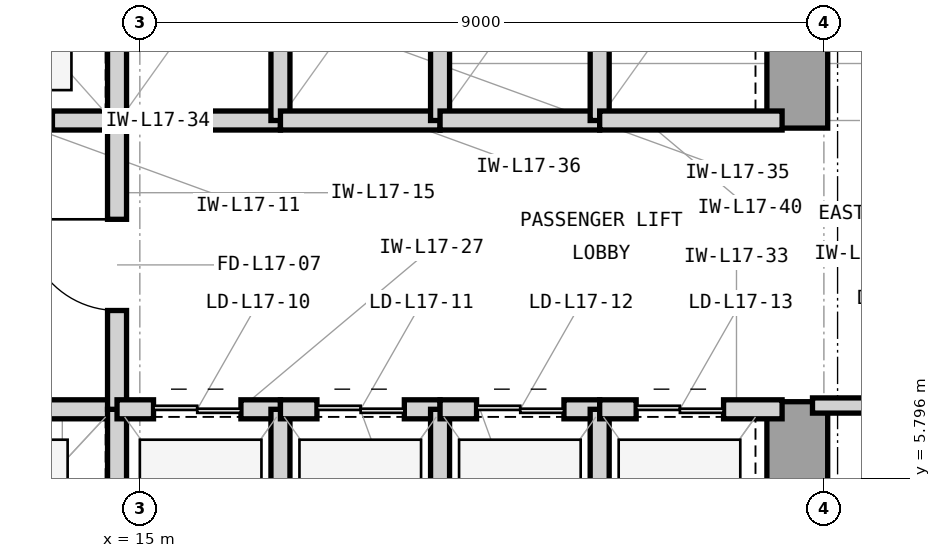
"""IFC4 building model, lengths in metres.
Left out: names, types, materials, properties, quantities, classifications, styles, units other than length and angle.
Written with IfcOpenShell. Run it as: python <this file> out.ifc"""

import sys

from ifc_helpers import new_model, si_unit, direction, frame, frame_2d, origin, place, context, subcontext, project, spatial, rectangle, extrude, element, fill, save


model = new_model("IFC4")
c1 = context("Model", 3, precision=1e-05, world=origin(), true_north=direction((0.0, 1.0)))
c2 = subcontext(c1, "Body", "Model", "MODEL_VIEW")
j1 = project(units=[si_unit("LENGTHUNIT", "METRE"), si_unit("PLANEANGLEUNIT", "RADIAN")], contexts=[c1])
p1 = place(None, origin())
s1 = spatial("IfcSite", under=j1, at=p1, CompositionType="ELEMENT")
p2 = place(p1, origin())
s2 = spatial("IfcBuilding", under=s1, at=p2, CompositionType="ELEMENT")
p3 = place(p2, frame((0.0, 0.0, 76.2)))
s3 = spatial("IfcBuildingStorey", under=s2, at=p3, CompositionType="ELEMENT", Elevation=76.2)
p4 = place(p3, frame((23.65, 3.75, 0.0), z_axis=(0.0, 0.0, 1.0), x_axis=(0.0, 1.0, 0.0)))
e1 = element("IfcWall", 1, at=p4, inside=s3, PredefinedType="SHEAR", context=c2, shape_type="SweptSolid", body=[
    extrude(rectangle(XDim=3.05, YDim=0.8, at=frame_2d((1.525, 0.0))), origin(), (0.0, 0.0, 1.0), 4.2),
])
p5 = place(p3, frame((23.65, 10.4, 0.0), z_axis=(0.0, 0.0, 1.0), x_axis=(0.0, 1.0, 0.0)))
e2 = element("IfcWall", 2, at=p5, inside=s3, PredefinedType="SHEAR", context=c2, shape_type="SweptSolid", body=[
    extrude(rectangle(XDim=3.2, YDim=0.8, at=frame_2d((1.6, 0.0))), origin(), (0.0, 0.0, 1.0), 4.2),
])
p6 = place(p3, frame((11.82, 6.7, 0.0), z_axis=(0.0, 0.0, 1.0), x_axis=(1.0, 0.0, 0.0)))
e3 = element("IfcWall", 3, at=p6, inside=s3, PredefinedType="PARTITIONING", context=c2, shape_type="SweptSolid", body=[
    extrude(rectangle(XDim=2.88, YDim=0.25, at=frame_2d((1.44, 0.0))), origin(), (0.0, 0.0, 1.0), 3.426),
])
p7 = place(p6, frame((0.85, 0.0, 0.0)))
e4 = element("IfcOpeningElement", 4, at=p7, cuts=e3, PredefinedType="OPENING", context=c2, shape_type="SweptSolid", body=[
    extrude(rectangle(XDim=1.1, YDim=2.25, at=frame_2d((0.55, 1.125))), frame((0.0, 0.135, 0.0), z_axis=(0.0, -1.0, 0.0), x_axis=(1.0, 0.0, 0.0)), (0.0, 0.0, 1.0), 0.27),
])
p8 = place(p3, frame((14.7, 3.35, 0.0), z_axis=(0.0, 0.0, 1.0), x_axis=(0.0, 1.0, 0.0)))
e5 = element("IfcWall", 5, at=p8, inside=s3, PredefinedType="PARTITIONING", context=c2, shape_type="SweptSolid", body=[
    extrude(rectangle(XDim=3.35, YDim=0.25, at=frame_2d((1.675, 0.0))), origin(), (0.0, 0.0, 1.0), 3.97),
])
p9 = place(p3, frame((11.95, 10.5, 0.0), z_axis=(0.0, 0.0, 1.0), x_axis=(1.0, 0.0, 0.0)))
e6 = element("IfcWall", 6, at=p9, inside=s3, PredefinedType="PARTITIONING", context=c2, shape_type="SweptSolid", body=[
    extrude(rectangle(XDim=2.75, YDim=0.25, at=frame_2d((1.375, 0.0))), origin(), (0.0, 0.0, 1.0), 3.426),
])
p10 = place(p9, frame((0.8, 0.0, 0.0)))
e7 = element("IfcOpeningElement", 7, at=p10, cuts=e6, PredefinedType="OPENING", context=c2, shape_type="SweptSolid", body=[
    extrude(rectangle(XDim=1.1, YDim=2.25, at=frame_2d((0.55, 1.125))), frame((0.0, 0.135, 0.0), z_axis=(0.0, -1.0, 0.0), x_axis=(1.0, 0.0, 0.0)), (0.0, 0.0, 1.0), 0.27),
])
p11 = place(p3, frame((14.7, 10.5, 0.0), z_axis=(0.0, 0.0, 1.0), x_axis=(0.0, 1.0, 0.0)))
e8 = element("IfcWall", 8, at=p11, inside=s3, PredefinedType="PARTITIONING", context=c2, shape_type="SweptSolid", body=[
    extrude(rectangle(XDim=3.0, YDim=0.25, at=frame_2d((1.5, 0.0))), origin(), (0.0, 0.0, 1.0), 3.97),
])
p12 = place(p3, frame((14.7, 6.7, 0.0), z_axis=(0.0, 0.0, 1.0), x_axis=(0.0, 1.0, 0.0)))
e9 = element("IfcWall", 9, at=p12, inside=s3, PredefinedType="PARTITIONING", context=c2, shape_type="SweptSolid", body=[
    extrude(rectangle(XDim=3.8, YDim=0.25, at=frame_2d((1.9, 0.0))), origin(), (0.0, 0.0, 1.0), 3.97),
])
p13 = place(p12, frame((1.3, 0.0, 0.0)))
e10 = element("IfcOpeningElement", 10, at=p13, cuts=e9, PredefinedType="OPENING", context=c2, shape_type="SweptSolid", body=[
    extrude(rectangle(XDim=1.2, YDim=2.2, at=frame_2d((0.6, 1.1))), frame((0.0, 0.135, 0.0), z_axis=(0.0, -1.0, 0.0), x_axis=(1.0, 0.0, 0.0)), (0.0, 0.0, 1.0), 0.27),
])
p14 = place(p3, frame((14.7, 6.7, 0.0), z_axis=(0.0, 0.0, 1.0), x_axis=(1.0, 0.0, 0.0)))
e11 = element("IfcWall", 11, at=p14, inside=s3, PredefinedType="PARTITIONING", context=c2, shape_type="SweptSolid", body=[
    extrude(rectangle(XDim=2.15, YDim=0.25, at=frame_2d((1.075, 0.0))), origin(), (0.0, 0.0, 1.0), 3.426),
])
p15 = place(p14, frame((0.48, 0.0, 0.0)))
e12 = element("IfcOpeningElement", 12, at=p15, cuts=e11, PredefinedType="OPENING", context=c2, shape_type="SweptSolid", body=[
    extrude(rectangle(XDim=1.15, YDim=2.25, at=frame_2d((0.575, 1.125))), frame((0.0, 0.135, 0.0), z_axis=(0.0, -1.0, 0.0), x_axis=(1.0, 0.0, 0.0)), (0.0, 0.0, 1.0), 0.27),
])
p16 = place(p3, frame((16.85, 3.35, 0.0), z_axis=(0.0, 0.0, 1.0), x_axis=(0.0, 1.0, 0.0)))
e13 = element("IfcWall", 13, at=p16, inside=s3, PredefinedType="PARTITIONING", context=c2, shape_type="SweptSolid", body=[
    extrude(rectangle(XDim=3.35, YDim=0.25, at=frame_2d((1.675, 0.0))), origin(), (0.0, 0.0, 1.0), 3.97),
])
p17 = place(p3, frame((16.85, 6.7, 0.0), z_axis=(0.0, 0.0, 1.0), x_axis=(1.0, 0.0, 0.0)))
e14 = element("IfcWall", 14, at=p17, inside=s3, PredefinedType="PARTITIONING", context=c2, shape_type="SweptSolid", body=[
    extrude(rectangle(XDim=2.1, YDim=0.25, at=frame_2d((1.05, 0.0))), origin(), (0.0, 0.0, 1.0), 3.426),
])
p18 = place(p17, frame((0.48, 0.0, 0.0)))
e15 = element("IfcOpeningElement", 15, at=p18, cuts=e14, PredefinedType="OPENING", context=c2, shape_type="SweptSolid", body=[
    extrude(rectangle(XDim=1.15, YDim=2.25, at=frame_2d((0.575, 1.125))), frame((0.0, 0.135, 0.0), z_axis=(0.0, -1.0, 0.0), x_axis=(1.0, 0.0, 0.0)), (0.0, 0.0, 1.0), 0.27),
])
p19 = place(p3, frame((18.95, 3.35, 0.0), z_axis=(0.0, 0.0, 1.0), x_axis=(0.0, 1.0, 0.0)))
e16 = element("IfcWall", 16, at=p19, inside=s3, PredefinedType="PARTITIONING", context=c2, shape_type="SweptSolid", body=[
    extrude(rectangle(XDim=3.35, YDim=0.25, at=frame_2d((1.675, 0.0))), origin(), (0.0, 0.0, 1.0), 3.97),
])
p20 = place(p3, frame((18.95, 6.7, 0.0), z_axis=(0.0, 0.0, 1.0), x_axis=(1.0, 0.0, 0.0)))
e17 = element("IfcWall", 17, at=p20, inside=s3, PredefinedType="PARTITIONING", context=c2, shape_type="SweptSolid", body=[
    extrude(rectangle(XDim=2.1, YDim=0.25, at=frame_2d((1.05, 0.0))), origin(), (0.0, 0.0, 1.0), 3.426),
])
p21 = place(p20, frame((0.48, 0.0, 0.0)))
e18 = element("IfcOpeningElement", 18, at=p21, cuts=e17, PredefinedType="OPENING", context=c2, shape_type="SweptSolid", body=[
    extrude(rectangle(XDim=1.15, YDim=2.25, at=frame_2d((0.575, 1.125))), frame((0.0, 0.135, 0.0), z_axis=(0.0, -1.0, 0.0), x_axis=(1.0, 0.0, 0.0)), (0.0, 0.0, 1.0), 0.27),
])
p22 = place(p3, frame((21.05, 3.35, 0.0), z_axis=(0.0, 0.0, 1.0), x_axis=(0.0, 1.0, 0.0)))
e19 = element("IfcWall", 19, at=p22, inside=s3, PredefinedType="PARTITIONING", context=c2, shape_type="SweptSolid", body=[
    extrude(rectangle(XDim=3.35, YDim=0.25, at=frame_2d((1.675, 0.0))), origin(), (0.0, 0.0, 1.0), 3.97),
])
p23 = place(p3, frame((21.05, 6.7, 0.0), z_axis=(0.0, 0.0, 1.0), x_axis=(1.0, 0.0, 0.0)))
e20 = element("IfcWall", 20, at=p23, inside=s3, PredefinedType="PARTITIONING", context=c2, shape_type="SweptSolid", body=[
    extrude(rectangle(XDim=2.4, YDim=0.25, at=frame_2d((1.2, 0.0))), origin(), (0.0, 0.0, 1.0), 3.426),
])
p24 = place(p23, frame((0.48, 0.0, 0.0)))
e21 = element("IfcOpeningElement", 21, at=p24, cuts=e20, PredefinedType="OPENING", context=c2, shape_type="SweptSolid", body=[
    extrude(rectangle(XDim=1.15, YDim=2.25, at=frame_2d((0.575, 1.125))), frame((0.0, 0.135, 0.0), z_axis=(0.0, -1.0, 0.0), x_axis=(1.0, 0.0, 0.0)), (0.0, 0.0, 1.0), 0.27),
])
p25 = place(p3, frame((14.7, 10.5, 0.0), z_axis=(0.0, 0.0, 1.0), x_axis=(1.0, 0.0, 0.0)))
e22 = element("IfcWall", 22, at=p25, inside=s3, PredefinedType="PARTITIONING", context=c2, shape_type="SweptSolid", body=[
    extrude(rectangle(XDim=2.15, YDim=0.25, at=frame_2d((1.075, 0.0))), origin(), (0.0, 0.0, 1.0), 3.426),
])
p26 = place(p3, frame((16.85, 10.5, 0.0), z_axis=(0.0, 0.0, 1.0), x_axis=(0.0, 1.0, 0.0)))
e23 = element("IfcWall", 23, at=p26, inside=s3, PredefinedType="PARTITIONING", context=c2, shape_type="SweptSolid", body=[
    extrude(rectangle(XDim=3.0, YDim=0.25, at=frame_2d((1.5, 0.0))), origin(), (0.0, 0.0, 1.0), 3.97),
])
p27 = place(p3, frame((16.85, 10.5, 0.0), z_axis=(0.0, 0.0, 1.0), x_axis=(1.0, 0.0, 0.0)))
e24 = element("IfcWall", 24, at=p27, inside=s3, PredefinedType="PARTITIONING", context=c2, shape_type="SweptSolid", body=[
    extrude(rectangle(XDim=2.1, YDim=0.25, at=frame_2d((1.05, 0.0))), origin(), (0.0, 0.0, 1.0), 3.426),
])
p28 = place(p3, frame((18.95, 10.5, 0.0), z_axis=(0.0, 0.0, 1.0), x_axis=(0.0, 1.0, 0.0)))
e25 = element("IfcWall", 25, at=p28, inside=s3, PredefinedType="PARTITIONING", context=c2, shape_type="SweptSolid", body=[
    extrude(rectangle(XDim=3.0, YDim=0.25, at=frame_2d((1.5, 0.0))), origin(), (0.0, 0.0, 1.0), 3.97),
])
p29 = place(p3, frame((18.95, 10.5, 0.0), z_axis=(0.0, 0.0, 1.0), x_axis=(1.0, 0.0, 0.0)))
e26 = element("IfcWall", 26, at=p29, inside=s3, PredefinedType="PARTITIONING", context=c2, shape_type="SweptSolid", body=[
    extrude(rectangle(XDim=2.1, YDim=0.25, at=frame_2d((1.05, 0.0))), origin(), (0.0, 0.0, 1.0), 3.426),
])
p30 = place(p3, frame((21.05, 10.5, 0.0), z_axis=(0.0, 0.0, 1.0), x_axis=(0.0, 1.0, 0.0)))
e27 = element("IfcWall", 27, at=p30, inside=s3, PredefinedType="PARTITIONING", context=c2, shape_type="SweptSolid", body=[
    extrude(rectangle(XDim=3.0, YDim=0.25, at=frame_2d((1.5, 0.0))), origin(), (0.0, 0.0, 1.0), 3.97),
])
p31 = place(p3, frame((21.05, 10.5, 0.0), z_axis=(0.0, 0.0, 1.0), x_axis=(1.0, 0.0, 0.0)))
e28 = element("IfcWall", 28, at=p31, inside=s3, PredefinedType="PARTITIONING", context=c2, shape_type="SweptSolid", body=[
    extrude(rectangle(XDim=2.4, YDim=0.25, at=frame_2d((1.2, 0.0))), origin(), (0.0, 0.0, 1.0), 3.426),
])
p32 = place(p3, frame((23.85, 6.75, 0.0), z_axis=(0.0, 0.0, 1.0), x_axis=(1.0, 0.0, 0.0)))
e29 = element("IfcWall", 29, at=p32, inside=s3, PredefinedType="PARTITIONING", context=c2, shape_type="SweptSolid", body=[
    extrude(rectangle(XDim=2.85, YDim=0.2, at=frame_2d((1.425, 0.0))), origin(), (0.0, 0.0, 1.0), 3.97),
])
p33 = place(p32, frame((0.7, 0.0, 0.0)))
e30 = element("IfcOpeningElement", 30, at=p33, cuts=e29, PredefinedType="OPENING", context=c2, shape_type="SweptSolid", body=[
    extrude(rectangle(XDim=1.0, YDim=2.15, at=frame_2d((0.5, 1.075))), frame((0.0, 0.11, 0.0), z_axis=(0.0, -1.0, 0.0), x_axis=(1.0, 0.0, 0.0)), (0.0, 0.0, 1.0), 0.22),
])
p34 = place(p13, origin())
e31 = element("IfcDoor", 31, at=p34, inside=s3, OperationType="SINGLE_SWING_RIGHT", PredefinedType="DOOR", context=c2, shape_type="SweptSolid", body=[
    extrude(rectangle(XDim=1.2, YDim=2.2, at=frame_2d((0.6, 1.1))), frame((0.0, 0.025, 0.0), z_axis=(0.0, -1.0, 0.0), x_axis=(1.0, 0.0, 0.0)), (0.0, 0.0, 1.0), 0.05),
])
fill(e10, e31)
p35 = place(p15, origin())
e32 = element("IfcDoor", 32, at=p35, inside=s3, OperationType="DOUBLE_DOOR_SLIDING", PredefinedType="DOOR", context=c2, shape_type="SweptSolid", body=[
    extrude(rectangle(XDim=1.15, YDim=2.25, at=frame_2d((0.575, 1.125))), frame((0.0, 0.025, 0.0), z_axis=(0.0, -1.0, 0.0), x_axis=(1.0, 0.0, 0.0)), (0.0, 0.0, 1.0), 0.05),
])
fill(e12, e32)
p36 = place(p18, origin())
e33 = element("IfcDoor", 33, at=p36, inside=s3, OperationType="DOUBLE_DOOR_SLIDING", PredefinedType="DOOR", context=c2, shape_type="SweptSolid", body=[
    extrude(rectangle(XDim=1.15, YDim=2.25, at=frame_2d((0.575, 1.125))), frame((0.0, 0.025, 0.0), z_axis=(0.0, -1.0, 0.0), x_axis=(1.0, 0.0, 0.0)), (0.0, 0.0, 1.0), 0.05),
])
fill(e15, e33)
p37 = place(p21, origin())
e34 = element("IfcDoor", 34, at=p37, inside=s3, OperationType="DOUBLE_DOOR_SLIDING", PredefinedType="DOOR", context=c2, shape_type="SweptSolid", body=[
    extrude(rectangle(XDim=1.15, YDim=2.25, at=frame_2d((0.575, 1.125))), frame((0.0, 0.025, 0.0), z_axis=(0.0, -1.0, 0.0), x_axis=(1.0, 0.0, 0.0)), (0.0, 0.0, 1.0), 0.05),
])
fill(e18, e34)
p38 = place(p24, origin())
e35 = element("IfcDoor", 35, at=p38, inside=s3, OperationType="DOUBLE_DOOR_SLIDING", PredefinedType="DOOR", context=c2, shape_type="SweptSolid", body=[
    extrude(rectangle(XDim=1.15, YDim=2.25, at=frame_2d((0.575, 1.125))), frame((0.0, 0.025, 0.0), z_axis=(0.0, -1.0, 0.0), x_axis=(1.0, 0.0, 0.0)), (0.0, 0.0, 1.0), 0.05),
])
fill(e21, e35)
save(model, sys.argv[1])
